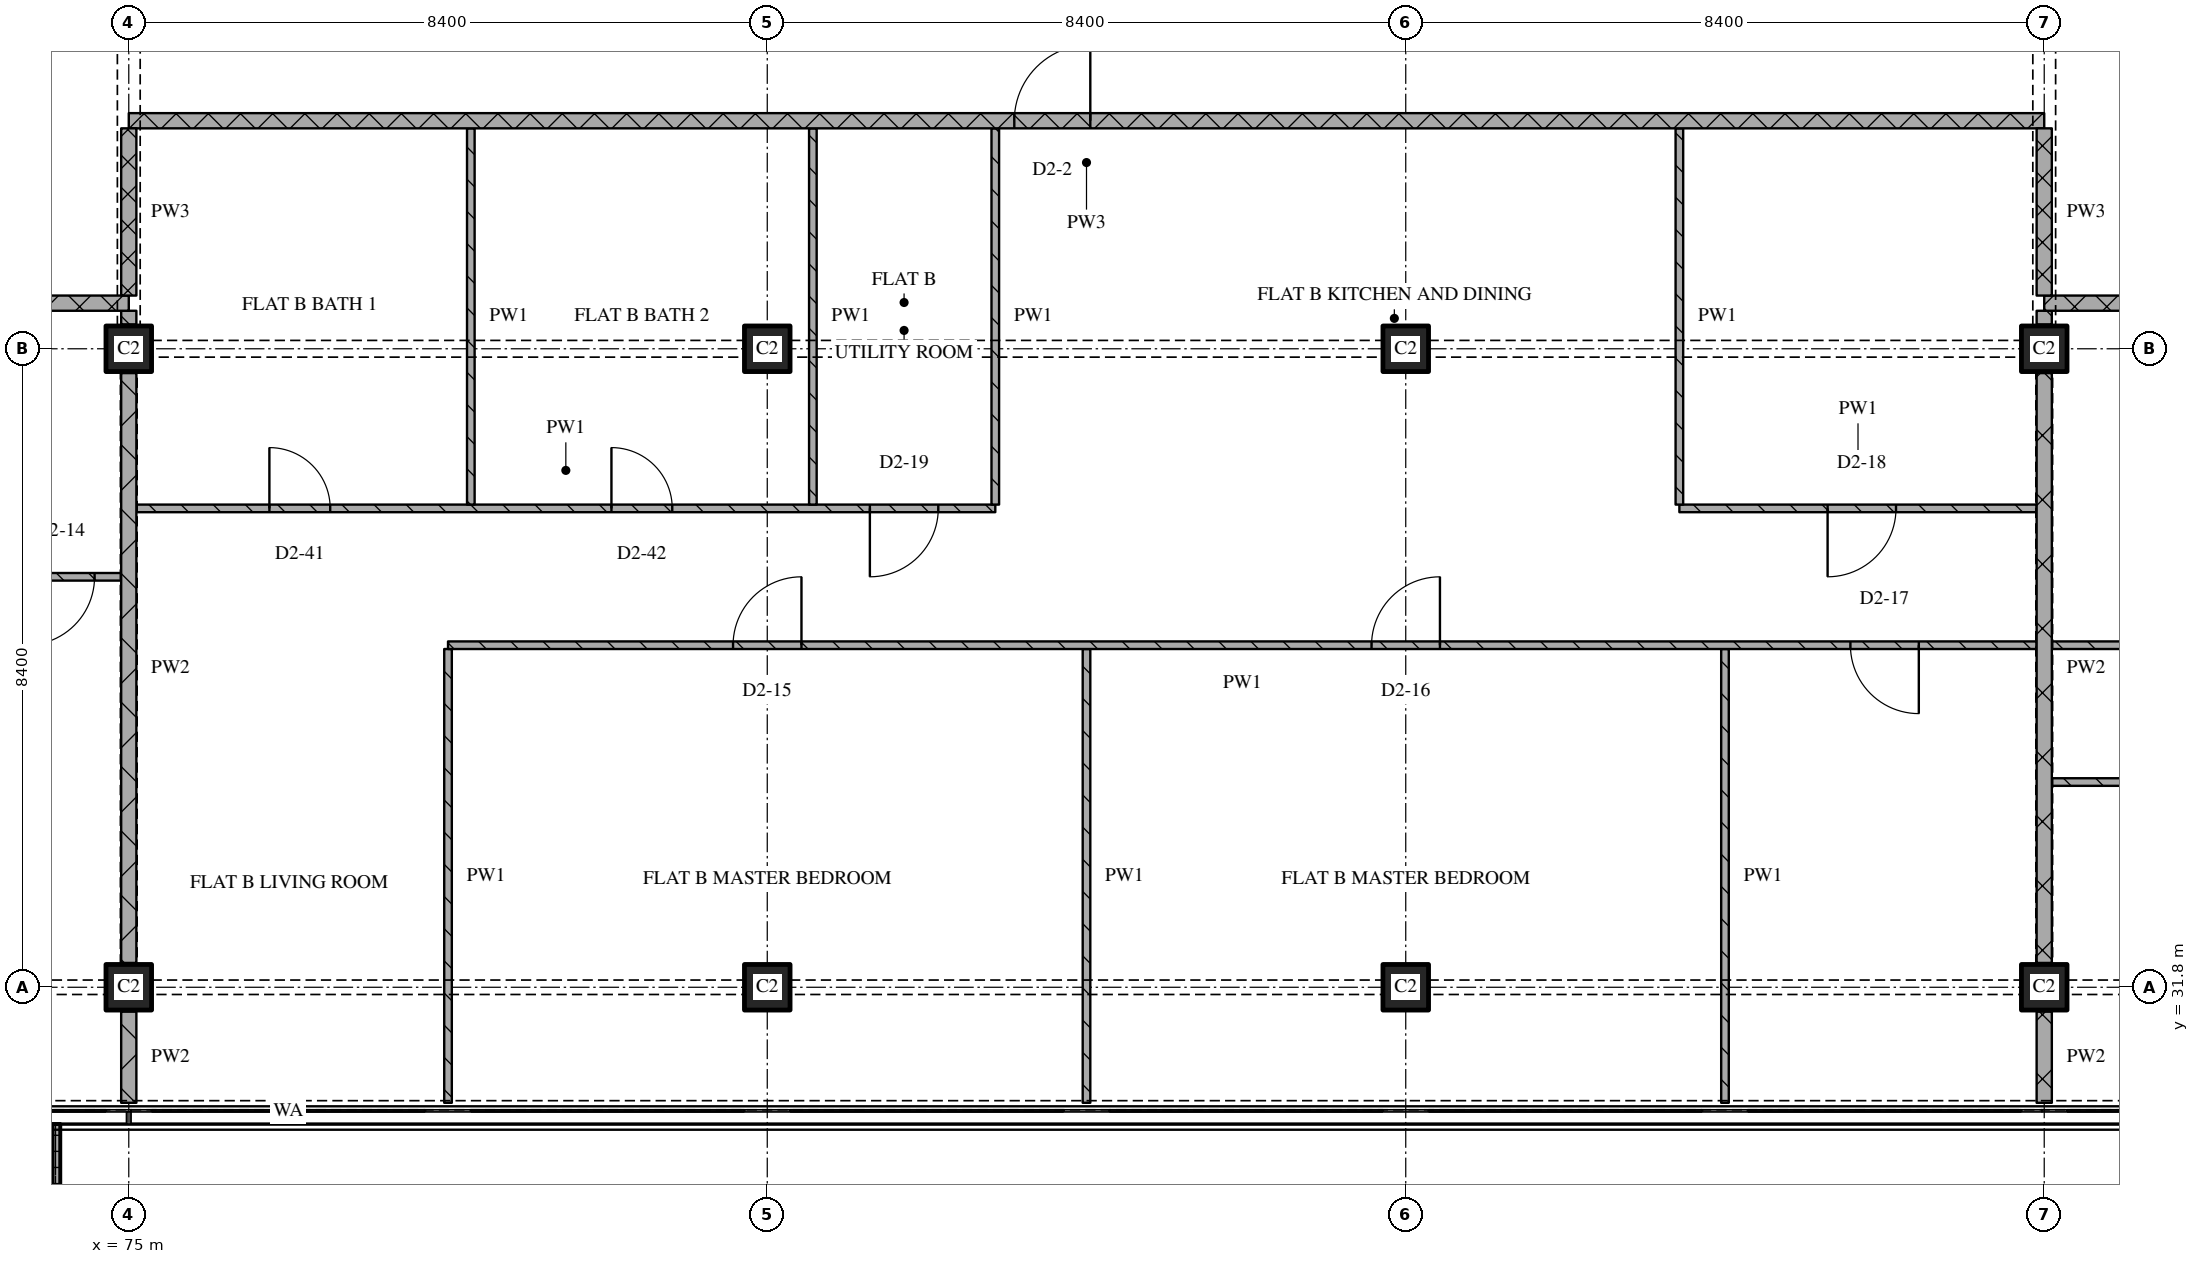
"""IFC4 building model, lengths in metres.
Left out: names, types, materials, properties, quantities, classifications, styles, units other than length and angle.
Written with IfcOpenShell. Run it as: python <this file> out.ifc"""

import sys

from ifc_helpers import new_model, si_unit, direction, frame, frame_2d, origin, origin_2d, place, context, subcontext, project, spatial, polyline, rectangle, outline, extrude, element, fill, save


model = new_model("IFC4")
c1 = context("Model", 3, precision=1e-05, world=origin(), true_north=direction((0.0, 1.0)))
c2 = subcontext(c1, "Body", "Model", "MODEL_VIEW")
j1 = project(units=[si_unit("LENGTHUNIT", "METRE"), si_unit("PLANEANGLEUNIT", "RADIAN")], contexts=[c1])
p1 = place(None, origin())
s1 = spatial("IfcSite", under=j1, at=p1, CompositionType="ELEMENT")
p2 = place(p1, origin())
s2 = spatial("IfcBuilding", under=s1, at=p2, CompositionType="ELEMENT")
p3 = place(p2, frame((0.0, 0.0, 223.5)))
s3 = spatial("IfcBuildingStorey", under=s2, at=p3, CompositionType="ELEMENT", Elevation=223.5)
for number, where, z_axis, x_axis in (
    (1, (75.0, 31.8, 0.0), (0.0, 0.0, 1.0), (1.0, 0.0, 0.0)),
    (2, (75.0, 40.2, 0.0), (0.0, 0.0, 1.0), (1.0, 0.0, 0.0)),
    (3, (83.4, 31.8, 0.0), (0.0, 0.0, 1.0), (1.0, 0.0, 0.0)),
    (4, (83.4, 40.2, 0.0), (0.0, 0.0, 1.0), (1.0, 0.0, 0.0)),
    (5, (91.8, 31.8, 0.0), (0.0, 0.0, 1.0), (1.0, 0.0, 0.0)),
    (6, (91.8, 40.2, 0.0), (0.0, 0.0, 1.0), (1.0, 0.0, 0.0)),
    (7, (100.2, 31.8, 0.0), (0.0, 0.0, 1.0), (1.0, 0.0, 0.0)),
    (8, (100.2, 40.2, 0.0), (0.0, 0.0, 1.0), (1.0, 0.0, 0.0)),
):
    element("IfcColumn", number, at=place(p3, frame(where, z_axis=z_axis, x_axis=x_axis)), inside=s3, PredefinedType="COLUMN", context=c2, shape_type="SweptSolid", body=[
        extrude(rectangle(XDim=0.6, YDim=0.6, at=origin_2d()), origin(), (0.0, 0.0, 1.0), 3.6),
    ])
p4 = place(p3, origin())
e9 = element("IfcWall", 9, at=p4, inside=s3, PredefinedType="SOLIDWALL", context=c2, shape_type="SweptSolid", body=[
    extrude(outline(polyline([(71.7, 30.0), (71.8, 30.0), (71.8, 28.5), (74.0, 28.5), (74.0, 30.0), (74.1, 30.0), (74.1, 28.4), (71.7, 28.4), (71.7, 30.0)])), origin(), (0.0, 0.0, 1.0), 1.0),
])
p5 = place(p3, frame((100.3, 34.5, 0.0), z_axis=(0.0, 0.0, 1.0), x_axis=(1.0, 0.0, 0.0)))
e10 = element("IfcWall", 10, at=p5, inside=s3, PredefinedType="PARTITIONING", context=c2, shape_type="SweptSolid", body=[
    extrude(rectangle(XDim=8.3, YDim=0.1, at=frame_2d((4.15, 0.0))), origin(), (0.0, 0.0, 1.0), 3.32),
])
p6 = place(p3, frame((64.2, 37.2, 0.0), z_axis=(0.0, 0.0, 1.0), x_axis=(1.0, 0.0, 0.0)))
e11 = element("IfcWall", 11, at=p6, inside=s3, PredefinedType="PARTITIONING", context=c2, shape_type="SweptSolid", body=[
    extrude(rectangle(XDim=10.7, YDim=0.1, at=frame_2d((5.35, 0.0))), origin(), (0.0, 0.0, 1.0), 3.32),
])
p7 = place(p6, frame((6.35, 0.0, 0.0)))
e12 = element("IfcOpeningElement", 12, at=p7, cuts=e11, PredefinedType="OPENING", context=c2, shape_type="SweptSolid", body=[
    extrude(rectangle(XDim=0.8, YDim=2.1, at=frame_2d((0.4, 1.05))), frame((0.0, 0.06, 0.0), z_axis=(0.0, -1.0, 0.0), x_axis=(1.0, 0.0, 0.0)), (0.0, 0.0, 1.0), 0.12),
])
p8 = place(p6, frame((9.45, 0.0, 0.0)))
e13 = element("IfcOpeningElement", 13, at=p8, cuts=e11, PredefinedType="OPENING", context=c2, shape_type="SweptSolid", body=[
    extrude(rectangle(XDim=0.9, YDim=2.1, at=frame_2d((0.45, 1.05))), frame((0.0, 0.06, 0.0), z_axis=(0.0, -1.0, 0.0), x_axis=(1.0, 0.0, 0.0)), (0.0, 0.0, 1.0), 0.12),
])
p9 = place(p3, frame((75.1, 38.1, 0.0), z_axis=(0.0, 0.0, 1.0), x_axis=(1.0, 0.0, 0.0)))
e14 = element("IfcWall", 14, at=p9, inside=s3, PredefinedType="PARTITIONING", context=c2, shape_type="SweptSolid", body=[
    extrude(rectangle(XDim=11.3, YDim=0.1, at=frame_2d((5.65, 0.0))), origin(), (0.0, 0.0, 1.0), 3.32),
])
p10 = place(p9, frame((1.75, 0.0, 0.0)))
e15 = element("IfcOpeningElement", 15, at=p10, cuts=e14, PredefinedType="OPENING", context=c2, shape_type="SweptSolid", body=[
    extrude(rectangle(XDim=0.8, YDim=2.1, at=frame_2d((0.4, 1.05))), frame((0.0, 0.06, 0.0), z_axis=(0.0, -1.0, 0.0), x_axis=(1.0, 0.0, 0.0)), (0.0, 0.0, 1.0), 0.12),
])
p11 = place(p9, frame((6.25, 0.0, 0.0)))
e16 = element("IfcOpeningElement", 16, at=p11, cuts=e14, PredefinedType="OPENING", context=c2, shape_type="SweptSolid", body=[
    extrude(rectangle(XDim=0.8, YDim=2.1, at=frame_2d((0.4, 1.05))), frame((0.0, 0.06, 0.0), z_axis=(0.0, -1.0, 0.0), x_axis=(1.0, 0.0, 0.0)), (0.0, 0.0, 1.0), 0.12),
])
p12 = place(p9, frame((9.65, 0.0, 0.0)))
e17 = element("IfcOpeningElement", 17, at=p12, cuts=e14, PredefinedType="OPENING", context=c2, shape_type="SweptSolid", body=[
    extrude(rectangle(XDim=0.9, YDim=2.1, at=frame_2d((0.45, 1.05))), frame((0.0, 0.06, 0.0), z_axis=(0.0, -1.0, 0.0), x_axis=(1.0, 0.0, 0.0)), (0.0, 0.0, 1.0), 0.12),
])
p13 = place(p3, frame((95.4, 38.1, 0.0), z_axis=(0.0, 0.0, 1.0), x_axis=(1.0, 0.0, 0.0)))
e18 = element("IfcWall", 18, at=p13, inside=s3, PredefinedType="PARTITIONING", context=c2, shape_type="SweptSolid", body=[
    extrude(rectangle(XDim=4.7, YDim=0.1, at=frame_2d((2.35, 0.0))), origin(), (0.0, 0.0, 1.0), 3.32),
])
p14 = place(p13, frame((1.95, 0.0, 0.0)))
e19 = element("IfcOpeningElement", 19, at=p14, cuts=e18, PredefinedType="OPENING", context=c2, shape_type="SweptSolid", body=[
    extrude(rectangle(XDim=0.9, YDim=2.1, at=frame_2d((0.45, 1.05))), frame((0.0, 0.06, 0.0), z_axis=(0.0, -1.0, 0.0), x_axis=(1.0, 0.0, 0.0)), (0.0, 0.0, 1.0), 0.12),
])
p15 = place(p3, frame((75.0, 40.8, 0.0), z_axis=(0.0, 0.0, 1.0), x_axis=(-1.0, 0.0, 0.0)))
e20 = element("IfcWall", 20, at=p15, inside=s3, PredefinedType="PARTITIONING", context=c2, shape_type="SweptSolid", body=[
    extrude(rectangle(XDim=24.38, YDim=0.2, at=frame_2d((12.19, 0.0))), origin(), (0.0, 0.0, 1.0), 3.32),
])
p16 = place(p15, frame((11.05, 0.0, 0.0)))
e21 = element("IfcOpeningElement", 21, at=p16, cuts=e20, PredefinedType="OPENING", context=c2, shape_type="SweptSolid", body=[
    extrude(rectangle(XDim=1.0, YDim=2.1, at=frame_2d((0.5, 1.05))), frame((0.0, 0.11, 0.0), z_axis=(0.0, -1.0, 0.0), x_axis=(1.0, 0.0, 0.0)), (0.0, 0.0, 1.0), 0.22),
])
p17 = place(p3, frame((124.58, 40.8, 0.0), z_axis=(0.0, 0.0, 1.0), x_axis=(-1.0, 0.0, 0.0)))
e22 = element("IfcWall", 22, at=p17, inside=s3, PredefinedType="PARTITIONING", context=c2, shape_type="SweptSolid", body=[
    extrude(rectangle(XDim=24.38, YDim=0.2, at=frame_2d((12.19, 0.0))), origin(), (0.0, 0.0, 1.0), 3.32),
])
p18 = place(p17, frame((14.43, 0.0, 0.0)))
e23 = element("IfcOpeningElement", 23, at=p18, cuts=e22, PredefinedType="OPENING", context=c2, shape_type="SweptSolid", body=[
    extrude(rectangle(XDim=1.0, YDim=2.1, at=frame_2d((0.5, 1.05))), frame((0.0, 0.11, 0.0), z_axis=(0.0, -1.0, 0.0), x_axis=(1.0, 0.0, 0.0)), (0.0, 0.0, 1.0), 0.22),
])
p19 = place(p3, frame((100.2, 43.2, 0.0), z_axis=(0.0, 0.0, 1.0), x_axis=(-1.0, 0.0, 0.0)))
e24 = element("IfcWall", 24, at=p19, inside=s3, PredefinedType="PARTITIONING", context=c2, shape_type="SweptSolid", body=[
    extrude(rectangle(XDim=25.2, YDim=0.2, at=frame_2d((12.6, 0.0))), origin(), (0.0, 0.0, 1.0), 3.32),
])
p20 = place(p19, frame((12.55, 0.0, 0.0)))
e25 = element("IfcOpeningElement", 25, at=p20, cuts=e24, PredefinedType="OPENING", context=c2, shape_type="SweptSolid", body=[
    extrude(rectangle(XDim=1.0, YDim=2.1, at=frame_2d((0.5, 1.05))), frame((0.0, 0.11, 0.0), z_axis=(0.0, -1.0, 0.0), x_axis=(1.0, 0.0, 0.0)), (0.0, 0.0, 1.0), 0.22),
])
p21 = place(p3, frame((75.0, 43.1, 0.0), z_axis=(0.0, 0.0, 1.0), x_axis=(0.0, -1.0, 0.0)))
e26 = element("IfcWall", 26, at=p21, inside=s3, PredefinedType="PARTITIONING", context=c2, shape_type="SweptSolid", body=[
    extrude(rectangle(XDim=2.2, YDim=0.2, at=frame_2d((1.1, 0.0))), origin(), (0.0, 0.0, 1.0), 2.53),
])
p22 = place(p3, frame((75.0, 31.48, 0.0), z_axis=(0.0, 0.0, 1.0), x_axis=(0.0, -1.0, 0.0)))
e27 = element("IfcWall", 27, at=p22, inside=s3, PredefinedType="PARTITIONING", context=c2, shape_type="SweptSolid", body=[
    extrude(rectangle(XDim=1.2, YDim=0.2, at=frame_2d((0.6, 0.0))), origin(), (0.0, 0.0, 1.0), 3.32),
])
p23 = place(p3, frame((75.0, 39.88, 0.0), z_axis=(0.0, 0.0, 1.0), x_axis=(0.0, -1.0, 0.0)))
e28 = element("IfcWall", 28, at=p23, inside=s3, PredefinedType="PARTITIONING", context=c2, shape_type="SweptSolid", body=[
    extrude(rectangle(XDim=7.76, YDim=0.2, at=frame_2d((3.88, 0.0))), origin(), (0.0, 0.0, 1.0), 2.72),
])
p24 = place(p3, frame((75.0, 40.7, 0.0), z_axis=(0.0, 0.0, 1.0), x_axis=(0.0, -1.0, 0.0)))
e29 = element("IfcWall", 29, at=p24, inside=s3, PredefinedType="PARTITIONING", context=c2, shape_type="SweptSolid", body=[
    extrude(rectangle(XDim=0.18, YDim=0.2, at=frame_2d((0.09, 0.0))), origin(), (0.0, 0.0, 1.0), 3.32),
])
p25 = place(p3, frame((79.2, 36.25, 0.0), z_axis=(0.0, 0.0, 1.0), x_axis=(0.0, -1.0, 0.0)))
e30 = element("IfcWall", 30, at=p25, inside=s3, PredefinedType="PARTITIONING", context=c2, shape_type="SweptSolid", body=[
    extrude(rectangle(XDim=5.97, YDim=0.1, at=frame_2d((2.985, 0.0))), origin(), (0.0, 0.0, 1.0), 3.32),
])
for number, where, z_axis, x_axis in (
    (31, (79.5, 43.1, 0.0), (0.0, 0.0, 1.0), (0.0, -1.0, 0.0)),
    (32, (84.0, 43.1, 0.0), (0.0, 0.0, 1.0), (0.0, -1.0, 0.0)),
    (33, (86.4, 43.1, 0.0), (0.0, 0.0, 1.0), (0.0, -1.0, 0.0)),
):
    element("IfcWall", number, at=place(p3, frame(where, z_axis=z_axis, x_axis=x_axis)), inside=s3, PredefinedType="PARTITIONING", context=c2, shape_type="SweptSolid", body=[
        extrude(rectangle(XDim=4.95, YDim=0.1, at=frame_2d((2.475, 0.0))), origin(), (0.0, 0.0, 1.0), 3.32),
    ])
p26 = place(p3, frame((87.6, 36.25, 0.0), z_axis=(0.0, 0.0, 1.0), x_axis=(0.0, -1.0, 0.0)))
e34 = element("IfcWall", 34, at=p26, inside=s3, PredefinedType="PARTITIONING", context=c2, shape_type="SweptSolid", body=[
    extrude(rectangle(XDim=5.97, YDim=0.1, at=frame_2d((2.985, 0.0))), origin(), (0.0, 0.0, 1.0), 3.32),
])
p27 = place(p3, frame((95.4, 43.1, 0.0), z_axis=(0.0, 0.0, 1.0), x_axis=(0.0, -1.0, 0.0)))
e35 = element("IfcWall", 35, at=p27, inside=s3, PredefinedType="PARTITIONING", context=c2, shape_type="SweptSolid", body=[
    extrude(rectangle(XDim=4.95, YDim=0.1, at=frame_2d((2.475, 0.0))), origin(), (0.0, 0.0, 1.0), 3.32),
])
p28 = place(p3, frame((96.0, 36.25, 0.0), z_axis=(0.0, 0.0, 1.0), x_axis=(0.0, -1.0, 0.0)))
e36 = element("IfcWall", 36, at=p28, inside=s3, PredefinedType="PARTITIONING", context=c2, shape_type="SweptSolid", body=[
    extrude(rectangle(XDim=5.97, YDim=0.1, at=frame_2d((2.985, 0.0))), origin(), (0.0, 0.0, 1.0), 3.32),
])
p29 = place(p3, frame((100.2, 43.1, 0.0), z_axis=(0.0, 0.0, 1.0), x_axis=(0.0, -1.0, 0.0)))
e37 = element("IfcWall", 37, at=p29, inside=s3, PredefinedType="PARTITIONING", context=c2, shape_type="SweptSolid", body=[
    extrude(rectangle(XDim=2.2, YDim=0.2, at=frame_2d((1.1, 0.0))), origin(), (0.0, 0.0, 1.0), 2.53),
])
p30 = place(p3, frame((100.2, 31.48, 0.0), z_axis=(0.0, 0.0, 1.0), x_axis=(0.0, -1.0, 0.0)))
e38 = element("IfcWall", 38, at=p30, inside=s3, PredefinedType="PARTITIONING", context=c2, shape_type="SweptSolid", body=[
    extrude(rectangle(XDim=1.2, YDim=0.2, at=frame_2d((0.6, 0.0))), origin(), (0.0, 0.0, 1.0), 3.32),
])
p31 = place(p3, frame((100.2, 39.88, 0.0), z_axis=(0.0, 0.0, 1.0), x_axis=(0.0, -1.0, 0.0)))
e39 = element("IfcWall", 39, at=p31, inside=s3, PredefinedType="PARTITIONING", context=c2, shape_type="SweptSolid", body=[
    extrude(rectangle(XDim=7.76, YDim=0.2, at=frame_2d((3.88, 0.0))), origin(), (0.0, 0.0, 1.0), 2.72),
])
p32 = place(p3, frame((100.2, 40.7, 0.0), z_axis=(0.0, 0.0, 1.0), x_axis=(0.0, -1.0, 0.0)))
e40 = element("IfcWall", 40, at=p32, inside=s3, PredefinedType="PARTITIONING", context=c2, shape_type="SweptSolid", body=[
    extrude(rectangle(XDim=0.18, YDim=0.2, at=frame_2d((0.09, 0.0))), origin(), (0.0, 0.0, 1.0), 3.32),
])
p33 = place(p3, frame((100.1, 36.3, 0.0), z_axis=(0.0, 0.0, 1.0), x_axis=(-1.0, 0.0, 0.0)))
e41 = element("IfcWall", 41, at=p33, inside=s3, PredefinedType="PARTITIONING", context=c2, shape_type="SweptSolid", body=[
    extrude(rectangle(XDim=20.9, YDim=0.1, at=frame_2d((10.45, 0.0))), origin(), (0.0, 0.0, 1.0), 3.32),
])
p34 = place(p33, frame((1.55, 0.0, 0.0)))
e42 = element("IfcOpeningElement", 42, at=p34, cuts=e41, PredefinedType="OPENING", context=c2, shape_type="SweptSolid", body=[
    extrude(rectangle(XDim=0.9, YDim=2.1, at=frame_2d((0.45, 1.05))), frame((0.0, 0.06, 0.0), z_axis=(0.0, -1.0, 0.0), x_axis=(1.0, 0.0, 0.0)), (0.0, 0.0, 1.0), 0.12),
])
p35 = place(p33, frame((7.85, 0.0, 0.0)))
e43 = element("IfcOpeningElement", 43, at=p35, cuts=e41, PredefinedType="OPENING", context=c2, shape_type="SweptSolid", body=[
    extrude(rectangle(XDim=0.9, YDim=2.1, at=frame_2d((0.45, 1.05))), frame((0.0, 0.06, 0.0), z_axis=(0.0, -1.0, 0.0), x_axis=(1.0, 0.0, 0.0)), (0.0, 0.0, 1.0), 0.12),
])
p36 = place(p33, frame((16.25, 0.0, 0.0)))
e44 = element("IfcOpeningElement", 44, at=p36, cuts=e41, PredefinedType="OPENING", context=c2, shape_type="SweptSolid", body=[
    extrude(rectangle(XDim=0.9, YDim=2.1, at=frame_2d((0.45, 1.05))), frame((0.0, 0.06, 0.0), z_axis=(0.0, -1.0, 0.0), x_axis=(1.0, 0.0, 0.0)), (0.0, 0.0, 1.0), 0.12),
])
p37 = place(p3, frame((100.3, 36.3, 0.0), z_axis=(0.0, 0.0, 1.0), x_axis=(1.0, 0.0, 0.0)))
e45 = element("IfcWall", 45, at=p37, inside=s3, PredefinedType="PARTITIONING", context=c2, shape_type="SweptSolid", body=[
    extrude(rectangle(XDim=8.6, YDim=0.1, at=frame_2d((4.3, 0.0))), origin(), (0.0, 0.0, 1.0), 3.32),
])
p38 = place(p37, frame((1.75, 0.0, 0.0)))
e46 = element("IfcOpeningElement", 46, at=p38, cuts=e45, PredefinedType="OPENING", context=c2, shape_type="SweptSolid", body=[
    extrude(rectangle(XDim=0.8, YDim=2.1, at=frame_2d((0.4, 1.05))), frame((0.0, 0.06, 0.0), z_axis=(0.0, -1.0, 0.0), x_axis=(1.0, 0.0, 0.0)), (0.0, 0.0, 1.0), 0.12),
])
p39 = place(p8, origin())
e47 = element("IfcDoor", 47, at=p39, inside=s3, OperationType="SINGLE_SWING_RIGHT", PredefinedType="DOOR", context=c2, shape_type="SweptSolid", body=[
    extrude(rectangle(XDim=0.9, YDim=2.1, at=frame_2d((0.45, 1.05))), frame((0.0, 0.025, 0.0), z_axis=(0.0, -1.0, 0.0), x_axis=(1.0, 0.0, 0.0)), (0.0, 0.0, 1.0), 0.05),
])
fill(e13, e47)
p40 = place(p10, origin())
e48 = element("IfcDoor", 48, at=p40, inside=s3, OperationType="SINGLE_SWING_LEFT", PredefinedType="DOOR", context=c2, shape_type="SweptSolid", body=[
    extrude(rectangle(XDim=0.8, YDim=2.1, at=frame_2d((0.4, 1.05))), frame((0.0, 0.025, 0.0), z_axis=(0.0, -1.0, 0.0), x_axis=(1.0, 0.0, 0.0)), (0.0, 0.0, 1.0), 0.05),
])
fill(e15, e48)
p41 = place(p11, origin())
e49 = element("IfcDoor", 49, at=p41, inside=s3, OperationType="SINGLE_SWING_LEFT", PredefinedType="DOOR", context=c2, shape_type="SweptSolid", body=[
    extrude(rectangle(XDim=0.8, YDim=2.1, at=frame_2d((0.4, 1.05))), frame((0.0, 0.025, 0.0), z_axis=(0.0, -1.0, 0.0), x_axis=(1.0, 0.0, 0.0)), (0.0, 0.0, 1.0), 0.05),
])
fill(e16, e49)
p42 = place(p12, origin())
e50 = element("IfcDoor", 50, at=p42, inside=s3, OperationType="SINGLE_SWING_RIGHT", PredefinedType="DOOR", context=c2, shape_type="SweptSolid", body=[
    extrude(rectangle(XDim=0.9, YDim=2.1, at=frame_2d((0.45, 1.05))), frame((0.0, 0.025, 0.0), z_axis=(0.0, -1.0, 0.0), x_axis=(1.0, 0.0, 0.0)), (0.0, 0.0, 1.0), 0.05),
])
fill(e17, e50)
p43 = place(p14, origin())
e51 = element("IfcDoor", 51, at=p43, inside=s3, OperationType="SINGLE_SWING_RIGHT", PredefinedType="DOOR", context=c2, shape_type="SweptSolid", body=[
    extrude(rectangle(XDim=0.9, YDim=2.1, at=frame_2d((0.45, 1.05))), frame((0.0, 0.025, 0.0), z_axis=(0.0, -1.0, 0.0), x_axis=(1.0, 0.0, 0.0)), (0.0, 0.0, 1.0), 0.05),
])
fill(e19, e51)
p44 = place(p20, origin())
e52 = element("IfcDoor", 52, at=p44, inside=s3, OperationType="SINGLE_SWING_RIGHT", PredefinedType="DOOR", context=c2, shape_type="SweptSolid", body=[
    extrude(rectangle(XDim=1.0, YDim=2.1, at=frame_2d((0.5, 1.05))), frame((0.0, 0.025, 0.0), z_axis=(0.0, -1.0, 0.0), x_axis=(1.0, 0.0, 0.0)), (0.0, 0.0, 1.0), 0.05),
])
fill(e25, e52)
p45 = place(p34, origin())
e53 = element("IfcDoor", 53, at=p45, inside=s3, OperationType="SINGLE_SWING_LEFT", PredefinedType="DOOR", context=c2, shape_type="SweptSolid", body=[
    extrude(rectangle(XDim=0.9, YDim=2.1, at=frame_2d((0.45, 1.05))), frame((0.0, 0.025, 0.0), z_axis=(0.0, -1.0, 0.0), x_axis=(1.0, 0.0, 0.0)), (0.0, 0.0, 1.0), 0.05),
])
fill(e42, e53)
p46 = place(p35, origin())
e54 = element("IfcDoor", 54, at=p46, inside=s3, OperationType="SINGLE_SWING_RIGHT", PredefinedType="DOOR", context=c2, shape_type="SweptSolid", body=[
    extrude(rectangle(XDim=0.9, YDim=2.1, at=frame_2d((0.45, 1.05))), frame((0.0, 0.025, 0.0), z_axis=(0.0, -1.0, 0.0), x_axis=(1.0, 0.0, 0.0)), (0.0, 0.0, 1.0), 0.05),
])
fill(e43, e54)
p47 = place(p36, origin())
e55 = element("IfcDoor", 55, at=p47, inside=s3, OperationType="SINGLE_SWING_RIGHT", PredefinedType="DOOR", context=c2, shape_type="SweptSolid", body=[
    extrude(rectangle(XDim=0.9, YDim=2.1, at=frame_2d((0.45, 1.05))), frame((0.0, 0.025, 0.0), z_axis=(0.0, -1.0, 0.0), x_axis=(1.0, 0.0, 0.0)), (0.0, 0.0, 1.0), 0.05),
])
fill(e44, e55)
save(model, sys.argv[1])
